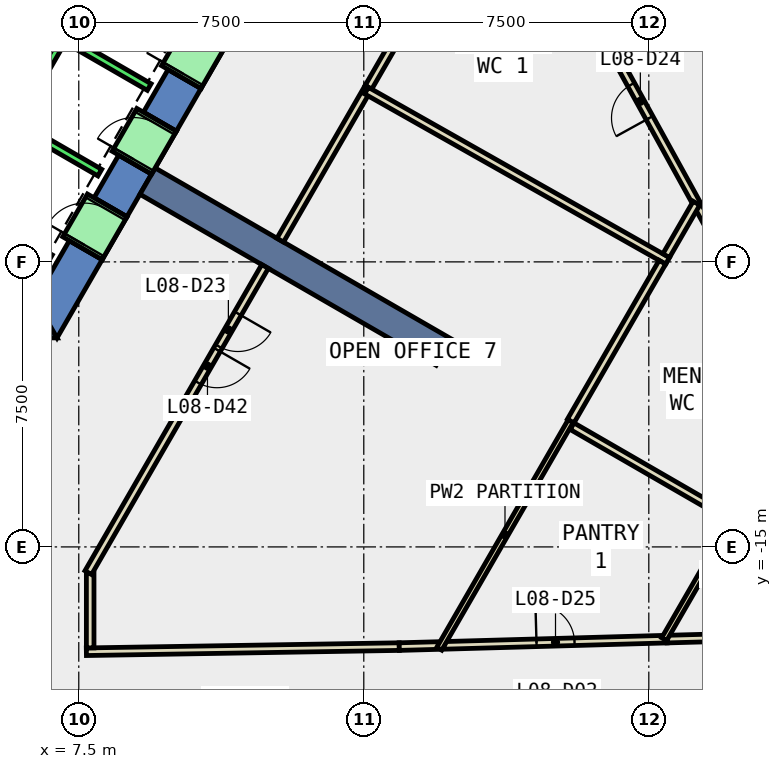
"""IFC4 building model, lengths in metres.
Left out: names, types, materials, properties, quantities, classifications, styles, units other than length and angle.
Written with IfcOpenShell. Run it as: python <this file> out.ifc"""

import sys

from ifc_helpers import new_model, si_unit, direction, frame, frame_2d, origin, place, context, subcontext, project, spatial, polyline, rectangle, outline, extrude, element, fill, save


model = new_model("IFC4")
c1 = context("Model", 3, precision=1e-05, world=origin(), true_north=direction((0.0, 1.0)))
c2 = subcontext(c1, "Body", "Model", "MODEL_VIEW")
j1 = project(units=[si_unit("LENGTHUNIT", "METRE"), si_unit("PLANEANGLEUNIT", "RADIAN")], contexts=[c1])
p1 = place(None, origin())
s1 = spatial("IfcSite", under=j1, at=p1, CompositionType="ELEMENT")
p2 = place(p1, origin())
s2 = spatial("IfcBuilding", under=s1, at=p2, CompositionType="ELEMENT")
p3 = place(p2, frame((0.0, 0.0, 43.4)))
s3 = spatial("IfcBuildingStorey", under=s2, at=p3, CompositionType="ELEMENT", Elevation=43.4)
p4 = place(p3, frame((0.0, 0.0, -0.4)))
e1 = element("IfcWall", 1, at=p4, inside=s3, PredefinedType="SHEAR", context=c2, shape_type="SweptSolid", body=[
    extrude(outline(polyline([(5.75, -8.5), (5.75, -9.5), (6.928, -9.5), (6.351, -8.5), (5.75, -8.5)])), origin(), (0.0, 0.0, 1.0), 4.2),
])
p5 = place(p3, frame((0.0, 0.0, -0.4)))
e2 = element("IfcWall", 2, at=p5, inside=s3, PredefinedType="SHEAR", context=c2, shape_type="SweptSolid", body=[
    extrude(outline(polyline([(8.117, -7.44), (7.252, -6.94), (6.351, -8.5), (6.928, -9.5), (8.117, -7.44)])), origin(), (0.0, 0.0, 1.0), 4.2),
])
p6 = place(p3, frame((0.0, 0.0, -0.4)))
e3 = element("IfcWall", 3, at=p6, inside=s3, PredefinedType="SHEAR", context=c2, shape_type="SweptSolid", body=[
    extrude(outline(polyline([(9.417, -5.189), (8.551, -4.689), (7.902, -5.814), (8.767, -6.314), (9.417, -5.189)])), origin(), (0.0, 0.0, 1.0), 4.2),
])
p7 = place(p3, frame((0.0, 0.0, -0.4)))
e4 = element("IfcWall", 4, at=p7, inside=s3, PredefinedType="SHEAR", context=c2, shape_type="SweptSolid", body=[
    extrude(outline(polyline([(10.717, -2.937), (9.851, -2.437), (9.201, -3.563), (10.067, -4.063), (10.717, -2.937)])), origin(), (0.0, 0.0, 1.0), 4.2),
])
p8 = place(p3, frame((0.0, 0.0, 3.6)))
e5 = element("IfcWall", 5, at=p8, inside=s3, PredefinedType="SHEAR", context=c2, shape_type="SweptSolid", body=[
    extrude(outline(polyline([(8.767, -6.314), (7.902, -5.814), (7.252, -6.94), (8.117, -7.44), (8.767, -6.314)])), origin(), (0.0, 0.0, 1.0), 0.2),
])
p9 = place(p3, frame((0.0, 0.0, 3.6)))
e6 = element("IfcWall", 6, at=p9, inside=s3, PredefinedType="SHEAR", context=c2, shape_type="SweptSolid", body=[
    extrude(outline(polyline([(10.067, -4.063), (9.201, -3.563), (8.551, -4.689), (9.417, -5.189), (10.067, -4.063)])), origin(), (0.0, 0.0, 1.0), 0.2),
])
p10 = place(p3, frame((0.0, 0.0, 3.6)))
e7 = element("IfcWall", 7, at=p10, inside=s3, PredefinedType="SHEAR", context=c2, shape_type="SweptSolid", body=[
    extrude(outline(polyline([(11.367, -1.811), (10.501, -1.311), (9.851, -2.437), (10.717, -2.937), (11.367, -1.811)])), origin(), (0.0, 0.0, 1.0), 0.2),
])
p11 = place(p3, frame((9.31, -5.375, -0.4), z_axis=(0.0, 0.0, 1.0), x_axis=(0.866017533419, -0.500013631625, 0.0)))
e8 = element("IfcWall", 8, at=p11, inside=s3, PredefinedType="SHEAR", context=c2, shape_type="SweptSolid", body=[
    extrude(rectangle(XDim=9.0, YDim=0.8, at=frame_2d((4.5, 0.0))), origin(), (0.0, 0.0, 1.0), 4.2),
])
p12 = place(p3, frame((7.7, -17.758, 0.0), z_axis=(0.0, 0.0, 1.0), x_axis=(0.999865574926, 0.016396099485, 0.0)))
e9 = element("IfcWall", 9, at=p12, inside=s3, PredefinedType="PARTITIONING", context=c2, shape_type="SweptSolid", body=[
    extrude(rectangle(XDim=8.234, YDim=0.2, at=frame_2d((4.117, 0.0))), origin(), (0.0, 0.0, 1.0), 3.8),
])
p13 = place(p3, frame((15.933, -17.623, 0.0), z_axis=(0.0, 0.0, 1.0), x_axis=(0.999627129061, 0.027305729179, 0.0)))
e10 = element("IfcWall", 10, at=p13, inside=s3, PredefinedType="PARTITIONING", context=c2, shape_type="SweptSolid", body=[
    extrude(rectangle(XDim=1.028, YDim=0.2, at=frame_2d((0.514, 0.0))), origin(), (0.0, 0.0, 1.0), 3.8),
])
p14 = place(p3, frame((23.803, -6.044, 0.0), z_axis=(0.0, 0.0, 1.0), x_axis=(-0.482588436287, 0.875847247619, 0.0)))
e11 = element("IfcWall", 11, at=p14, inside=s3, PredefinedType="PARTITIONING", context=c2, shape_type="SweptSolid", body=[
    extrude(rectangle(XDim=6.324, YDim=0.2, at=frame_2d((3.162, 0.0))), origin(), (0.0, 0.0, 1.0), 3.8),
])
p15 = place(p14, frame((2.662, 0.0, 0.0)))
e12 = element("IfcOpeningElement", 12, at=p15, cuts=e11, PredefinedType="OPENING", context=c2, shape_type="SweptSolid", body=[
    extrude(rectangle(XDim=1.0, YDim=2.1, at=frame_2d((0.5, 1.05))), frame((0.0, 0.11, 0.0), z_axis=(0.0, -1.0, 0.0), x_axis=(1.0, 0.0, 0.0)), (0.0, 0.0, 1.0), 0.22),
])
p16 = place(p3, frame((17.111, -17.591, 0.0), z_axis=(0.0, 0.0, 1.0), x_axis=(0.99960470841, 0.028114532261, 0.0)))
e13 = element("IfcWall", 13, at=p16, inside=s3, PredefinedType="PARTITIONING", context=c2, shape_type="SweptSolid", body=[
    extrude(rectangle(XDim=5.87, YDim=0.2, at=frame_2d((2.935, 0.0))), origin(), (0.0, 0.0, 1.0), 3.8),
])
p17 = place(p16, frame((2.435, 0.0, 0.0)))
e14 = element("IfcOpeningElement", 14, at=p17, cuts=e13, PredefinedType="OPENING", context=c2, shape_type="SweptSolid", body=[
    extrude(rectangle(XDim=1.0, YDim=2.1, at=frame_2d((0.5, 1.05))), frame((0.0, 0.11, 0.0), z_axis=(0.0, -1.0, 0.0), x_axis=(1.0, 0.0, 0.0)), (0.0, 0.0, 1.0), 0.22),
])
p18 = place(p3, frame((24.229, -6.818, 0.0), z_axis=(0.0, 0.0, 1.0), x_axis=(-0.482120251302, 0.876105052653, 0.0)))
e15 = element("IfcWall", 15, at=p18, inside=s3, PredefinedType="PARTITIONING", context=c2, shape_type="SweptSolid", body=[
    extrude(rectangle(XDim=0.884, YDim=0.2, at=frame_2d((0.442, 0.0))), origin(), (0.0, 0.0, 1.0), 3.8),
])
p19 = place(p3, frame((22.979, -17.426, 0.0), z_axis=(0.0, 0.0, 1.0), x_axis=(0.999623609507, 0.027434272674, 0.0)))
e16 = element("IfcWall", 16, at=p19, inside=s3, PredefinedType="PARTITIONING", context=c2, shape_type="SweptSolid", body=[
    extrude(rectangle(XDim=1.201, YDim=0.2, at=frame_2d((0.601, 0.0))), origin(), (0.0, 0.0, 1.0), 3.8),
])
p20 = place(p3, frame((22.847, 0.664, 0.0), z_axis=(0.0, 0.0, 1.0), x_axis=(0.482537844436, -0.875875121628, 0.0)))
e17 = element("IfcWall", 17, at=p20, inside=s3, PredefinedType="PARTITIONING", context=c2, shape_type="SweptSolid", body=[
    extrude(rectangle(XDim=3.542, YDim=0.2, at=frame_2d((1.771, 0.0))), origin(), (0.0, 0.0, 1.0), 3.8),
])
p21 = place(p3, frame((7.8, -15.69, 0.0), z_axis=(0.0, 0.0, 1.0), x_axis=(0.0, -1.0, 0.0)))
e18 = element("IfcWall", 18, at=p21, inside=s3, PredefinedType="PARTITIONING", context=c2, shape_type="SweptSolid", body=[
    extrude(rectangle(XDim=1.967, YDim=0.2, at=frame_2d((0.983, 0.0))), origin(), (0.0, 0.0, 1.0), 3.8),
])
p22 = place(p3, frame((15.122, -2.908, 0.0), z_axis=(0.0, 0.0, 1.0), x_axis=(-0.499922740561, -0.866070004948, 0.0)))
e19 = element("IfcWall", 19, at=p22, inside=s3, PredefinedType="PARTITIONING", context=c2, shape_type="SweptSolid", body=[
    extrude(rectangle(XDim=4.643, YDim=0.2, at=frame_2d((2.321, 0.0))), origin(), (0.0, 0.0, 1.0), 3.8),
])
p23 = place(p3, frame((18.705, 3.298, 0.0), z_axis=(0.0, 0.0, 1.0), x_axis=(-0.499993769413, -0.866029000986, 0.0)))
e20 = element("IfcWall", 20, at=p23, inside=s3, PredefinedType="PARTITIONING", context=c2, shape_type="SweptSolid", body=[
    extrude(rectangle(XDim=7.166, YDim=0.2, at=frame_2d((3.583, 0.0))), origin(), (0.0, 0.0, 1.0), 3.8),
])
p24 = place(p3, frame((15.072, -2.994, 0.0), z_axis=(0.0, 0.0, 1.0), x_axis=(0.87054185148, -0.49209438609, 0.0)))
e21 = element("IfcWall", 21, at=p24, inside=s3, PredefinedType="PARTITIONING", context=c2, shape_type="SweptSolid", body=[
    extrude(rectangle(XDim=9.1, YDim=0.2, at=frame_2d((4.55, 0.0))), origin(), (0.0, 0.0, 1.0), 3.8),
])
p25 = place(p3, frame((20.445, -11.688, 0.0), z_axis=(0.0, 0.0, 1.0), x_axis=(-0.500010633597, -0.866019264387, 0.0)))
e22 = element("IfcWall", 22, at=p25, inside=s3, PredefinedType="PARTITIONING", context=c2, shape_type="SweptSolid", body=[
    extrude(rectangle(XDim=6.918, YDim=0.15, at=frame_2d((3.459, 0.0))), origin(), (0.0, 0.0, 1.0), 3.8),
])
p26 = place(p3, frame((22.857, -7.51, 0.0), z_axis=(0.0, 0.0, 1.0), x_axis=(-0.499954636112, -0.866051593054, 0.0)))
e23 = element("IfcWall", 23, at=p26, inside=s3, PredefinedType="PARTITIONING", context=c2, shape_type="SweptSolid", body=[
    extrude(rectangle(XDim=4.824, YDim=0.2, at=frame_2d((2.412, 0.0))), origin(), (0.0, 0.0, 1.0), 3.8),
])
p27 = place(p3, frame((23.754, -5.956, 0.0), z_axis=(0.0, 0.0, 1.0), x_axis=(-0.500093796661, -0.865971243484, 0.0)))
e24 = element("IfcWall", 24, at=p27, inside=s3, PredefinedType="PARTITIONING", context=c2, shape_type="SweptSolid", body=[
    extrude(rectangle(XDim=1.594, YDim=0.2, at=frame_2d((0.797, 0.0))), origin(), (0.0, 0.0, 1.0), 3.8),
])
p28 = place(p3, frame((20.482, -11.824, 0.0), z_axis=(0.0, 0.0, 1.0), x_axis=(0.866022959057, -0.500004234368, 0.0)))
e25 = element("IfcWall", 25, at=p28, inside=s3, PredefinedType="PARTITIONING", context=c2, shape_type="SweptSolid", body=[
    extrude(rectangle(XDim=5.0, YDim=0.2, at=frame_2d((2.5, 0.0))), origin(), (0.0, 0.0, 1.0), 3.8),
])
p29 = place(p3, frame((24.675, -14.362, 0.0), z_axis=(0.0, 0.0, 1.0), x_axis=(-0.500187988959, -0.865916841101, 0.0)))
e26 = element("IfcWall", 26, at=p29, inside=s3, PredefinedType="PARTITIONING", context=c2, shape_type="SweptSolid", body=[
    extrude(rectangle(XDim=3.541, YDim=0.15, at=frame_2d((1.771, 0.0))), origin(), (0.0, 0.0, 1.0), 3.8),
])
p30 = place(p3, frame((12.401, -7.621, 0.0), z_axis=(0.0, 0.0, 1.0), x_axis=(-0.499983724212, -0.866034800411, 0.0)))
e27 = element("IfcWall", 27, at=p30, inside=s3, PredefinedType="PARTITIONING", context=c2, shape_type="SweptSolid", body=[
    extrude(rectangle(XDim=9.302, YDim=0.2, at=frame_2d((4.651, 0.0))), origin(), (0.0, 0.0, 1.0), 3.8),
])
p31 = place(p30, frame((1.429, 0.0, 0.0)))
e28 = element("IfcOpeningElement", 28, at=p31, cuts=e27, PredefinedType="OPENING", context=c2, shape_type="SweptSolid", body=[
    extrude(rectangle(XDim=1.0, YDim=2.1, at=frame_2d((0.5, 1.05))), frame((0.0, 0.11, 0.0), z_axis=(0.0, -1.0, 0.0), x_axis=(1.0, 0.0, 0.0)), (0.0, 0.0, 1.0), 0.22),
])
p32 = place(p30, frame((2.529, 0.0, 0.0)))
e29 = element("IfcOpeningElement", 29, at=p32, cuts=e27, PredefinedType="OPENING", context=c2, shape_type="SweptSolid", body=[
    extrude(rectangle(XDim=1.0, YDim=2.1, at=frame_2d((0.5, 1.05))), frame((0.0, 0.11, 0.0), z_axis=(0.0, -1.0, 0.0), x_axis=(1.0, 0.0, 0.0)), (0.0, 0.0, 1.0), 0.22),
])
p33 = place(p3, frame((5.492, -3.788, 0.0), z_axis=(0.0, 0.0, 1.0), x_axis=(0.500011755427, 0.866018616679, 0.0)))
e30 = element("IfcWall", 30, at=p33, inside=s3, PredefinedType="STANDARD", context=c2, shape_type="SweptSolid", body=[
    extrude(rectangle(XDim=2.8, YDim=0.2, at=frame_2d((1.4, 0.0))), origin(), (0.0, 0.0, 1.0), 3.8),
])
p34 = place(p3, frame((4.451, -6.19, 0.0), z_axis=(0.0, 0.0, 1.0), x_axis=(0.50000090737, 0.866024879913, 0.0)))
e31 = element("IfcWall", 31, at=p34, inside=s3, PredefinedType="STANDARD", context=c2, shape_type="SweptSolid", body=[
    extrude(rectangle(XDim=10.6, YDim=0.2, at=frame_2d((5.3, 0.0))), origin(), (0.0, 0.0, 1.0), 3.8),
])
for number, where, z_axis, x_axis in (
    (32, (4.588, -6.153, 0.0), (0.0, 0.0, 1.0), (0.866, -0.5, 0.0)),
    (33, (5.888, -3.902, 0.0), (0.0, 0.0, 1.0), (0.866, -0.5, 0.0)),
    (34, (7.188, -1.65, 0.0), (0.0, 0.0, 1.0), (0.866, -0.5, 0.0)),
):
    element("IfcWall", number, at=place(p3, frame(where, z_axis=z_axis, x_axis=x_axis)), inside=s3, PredefinedType="STANDARD", context=c2, shape_type="SweptSolid", body=[
        extrude(rectangle(XDim=2.5, YDim=0.2, at=frame_2d((1.25, 0.0))), origin(), (0.0, 0.0, 1.0), 3.8),
    ])
p35 = place(p3, frame((7.598, -7.14, 0.0), z_axis=(0.0, 0.0, 1.0), x_axis=(0.500362116554, 0.865816234728, 0.0)))
e35 = element("IfcWall", 35, at=p35, inside=s3, PredefinedType="STANDARD", context=c2, shape_type="SweptSolid", body=[
    extrude(rectangle(XDim=1.299, YDim=1.2, at=frame_2d((0.65, 0.0))), origin(), (0.0, 0.0, 1.0), 2.4),
])
p36 = place(p35, frame((0.1, 0.0, 0.0)))
e36 = element("IfcOpeningElement", 36, at=p36, cuts=e35, PredefinedType="OPENING", context=c2, shape_type="SweptSolid", body=[
    extrude(rectangle(XDim=1.1, YDim=2.3, at=frame_2d((0.55, 1.15))), frame((0.0, 0.61, 0.0), z_axis=(0.0, -1.0, 0.0), x_axis=(1.0, 0.0, 0.0)), (0.0, 0.0, 1.0), 1.22),
])
p37 = place(p3, frame((8.898, -4.889, 0.0), z_axis=(0.0, 0.0, 1.0), x_axis=(0.500036693733, 0.866004217611, 0.0)))
e37 = element("IfcWall", 37, at=p37, inside=s3, PredefinedType="STANDARD", context=c2, shape_type="SweptSolid", body=[
    extrude(rectangle(XDim=1.3, YDim=1.2, at=frame_2d((0.65, 0.0))), origin(), (0.0, 0.0, 1.0), 2.4),
])
p38 = place(p37, frame((0.1, 0.0, 0.0)))
e38 = element("IfcOpeningElement", 38, at=p38, cuts=e37, PredefinedType="OPENING", context=c2, shape_type="SweptSolid", body=[
    extrude(rectangle(XDim=1.1, YDim=2.3, at=frame_2d((0.55, 1.15))), frame((0.0, 0.61, 0.0), z_axis=(0.0, -1.0, 0.0), x_axis=(1.0, 0.0, 0.0)), (0.0, 0.0, 1.0), 1.22),
])
p39 = place(p3, frame((10.198, -2.637, 0.0), z_axis=(0.0, 0.0, 1.0), x_axis=(0.49989585183, 0.866085525409, 0.0)))
e39 = element("IfcWall", 39, at=p39, inside=s3, PredefinedType="STANDARD", context=c2, shape_type="SweptSolid", body=[
    extrude(rectangle(XDim=1.3, YDim=1.2, at=frame_2d((0.65, 0.0))), origin(), (0.0, 0.0, 1.0), 2.4),
])
p40 = place(p39, frame((0.1, 0.0, 0.0)))
e40 = element("IfcOpeningElement", 40, at=p40, cuts=e39, PredefinedType="OPENING", context=c2, shape_type="SweptSolid", body=[
    extrude(rectangle(XDim=1.1, YDim=2.3, at=frame_2d((0.55, 1.15))), frame((0.0, 0.61, 0.0), z_axis=(0.0, -1.0, 0.0), x_axis=(1.0, 0.0, 0.0)), (0.0, 0.0, 1.0), 1.22),
])
p41 = place(p31, origin())
e41 = element("IfcDoor", 41, at=p41, inside=s3, OperationType="SINGLE_SWING_LEFT", PredefinedType="DOOR", context=c2, shape_type="SweptSolid", body=[
    extrude(rectangle(XDim=1.0, YDim=2.1, at=frame_2d((0.5, 1.05))), frame((0.0, 0.025, 0.0), z_axis=(0.0, -1.0, 0.0), x_axis=(1.0, 0.0, 0.0)), (0.0, 0.0, 1.0), 0.05),
])
fill(e28, e41)
p42 = place(p15, origin())
e42 = element("IfcDoor", 42, at=p42, inside=s3, OperationType="SINGLE_SWING_LEFT", PredefinedType="DOOR", context=c2, shape_type="SweptSolid", body=[
    extrude(rectangle(XDim=1.0, YDim=2.1, at=frame_2d((0.5, 1.05))), frame((0.0, 0.025, 0.0), z_axis=(0.0, -1.0, 0.0), x_axis=(1.0, 0.0, 0.0)), (0.0, 0.0, 1.0), 0.05),
])
fill(e12, e42)
p43 = place(p17, origin())
e43 = element("IfcDoor", 43, at=p43, inside=s3, OperationType="SINGLE_SWING_LEFT", PredefinedType="DOOR", context=c2, shape_type="SweptSolid", body=[
    extrude(rectangle(XDim=1.0, YDim=2.1, at=frame_2d((0.5, 1.05))), frame((0.0, 0.025, 0.0), z_axis=(0.0, -1.0, 0.0), x_axis=(1.0, 0.0, 0.0)), (0.0, 0.0, 1.0), 0.05),
])
fill(e14, e43)
p44 = place(p32, origin())
e44 = element("IfcDoor", 44, at=p44, inside=s3, OperationType="SINGLE_SWING_RIGHT", PredefinedType="DOOR", context=c2, shape_type="SweptSolid", body=[
    extrude(rectangle(XDim=1.0, YDim=2.1, at=frame_2d((0.5, 1.05))), frame((0.0, 0.025, 0.0), z_axis=(0.0, -1.0, 0.0), x_axis=(1.0, 0.0, 0.0)), (0.0, 0.0, 1.0), 0.05),
])
fill(e29, e44)
p45 = place(p36, origin())
e45 = element("IfcDoor", 45, at=p45, inside=s3, OperationType="SLIDING_TO_LEFT", PredefinedType="DOOR", context=c2, shape_type="SweptSolid", body=[
    extrude(rectangle(XDim=1.1, YDim=2.3, at=frame_2d((0.55, 1.15))), frame((0.0, 0.025, 0.0), z_axis=(0.0, -1.0, 0.0), x_axis=(1.0, 0.0, 0.0)), (0.0, 0.0, 1.0), 0.05),
])
fill(e36, e45)
p46 = place(p38, origin())
e46 = element("IfcDoor", 46, at=p46, inside=s3, OperationType="SLIDING_TO_LEFT", PredefinedType="DOOR", context=c2, shape_type="SweptSolid", body=[
    extrude(rectangle(XDim=1.1, YDim=2.3, at=frame_2d((0.55, 1.15))), frame((0.0, 0.025, 0.0), z_axis=(0.0, -1.0, 0.0), x_axis=(1.0, 0.0, 0.0)), (0.0, 0.0, 1.0), 0.05),
])
fill(e38, e46)
p47 = place(p40, origin())
e47 = element("IfcDoor", 47, at=p47, inside=s3, OperationType="SLIDING_TO_LEFT", PredefinedType="DOOR", context=c2, shape_type="SweptSolid", body=[
    extrude(rectangle(XDim=1.1, YDim=2.3, at=frame_2d((0.55, 1.15))), frame((0.0, 0.025, 0.0), z_axis=(0.0, -1.0, 0.0), x_axis=(1.0, 0.0, 0.0)), (0.0, 0.0, 1.0), 0.05),
])
fill(e40, e47)
save(model, sys.argv[1])
